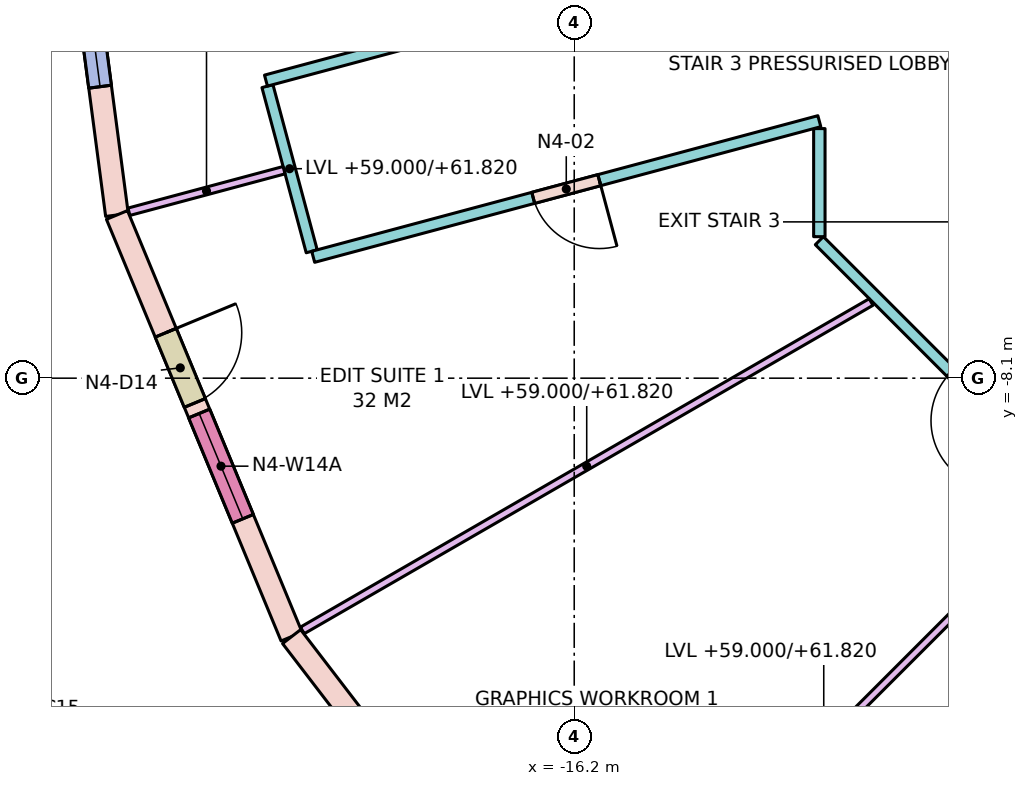
"""IFC4 building model, lengths in metres.
Left out: names, types, materials, properties, quantities, classifications, styles, units other than length and angle.
Written with IfcOpenShell. Run it as: python <this file> out.ifc"""

import sys

from ifc_helpers import new_model, si_unit, direction, frame, frame_2d, origin, place, context, subcontext, project, spatial, rectangle, extrude, element, fill, save


model = new_model("IFC4")
c1 = context("Model", 3, precision=1e-05, world=origin(), true_north=direction((0.0, 1.0)))
c2 = subcontext(c1, "Body", "Model", "MODEL_VIEW")
j1 = project(units=[si_unit("LENGTHUNIT", "METRE"), si_unit("PLANEANGLEUNIT", "RADIAN")], contexts=[c1])
p1 = place(None, origin())
s1 = spatial("IfcSite", under=j1, at=p1, CompositionType="ELEMENT")
p2 = place(p1, origin())
s2 = spatial("IfcBuilding", under=s1, at=p2, CompositionType="ELEMENT")
p3 = place(p2, frame((0.0, 0.0, 59.0)))
s3 = spatial("IfcBuildingStorey", under=s2, at=p3, CompositionType="ELEMENT", Elevation=59.0)
p4 = place(p3, frame((-23.0, 0.0, 0.0), z_axis=(0.0, 0.0, 1.0), x_axis=(0.130522880875, -0.991445297315, 0.0)))
e1 = element("IfcWall", 1, at=p4, inside=s3, PredefinedType="STANDARD", context=c2, shape_type="SweptSolid", body=[
    extrude(rectangle(XDim=6.004, YDim=0.3, at=frame_2d((3.002, 0.0))), origin(), (0.0, 0.0, 1.0), 3.72),
])
p5 = place(p4, frame((1.702, 0.0, 0.8)))
e2 = element("IfcOpeningElement", 2, at=p5, cuts=e1, PredefinedType="OPENING", context=c2, shape_type="SweptSolid", body=[
    extrude(rectangle(XDim=2.6, YDim=2.7, at=frame_2d((1.3, 1.35))), frame((0.0, 0.16, 0.0), z_axis=(0.0, -1.0, 0.0), x_axis=(1.0, 0.0, 0.0)), (0.0, 0.0, 1.0), 0.32),
])
p6 = place(p3, frame((-22.216, -5.953, 0.0), z_axis=(0.0, 0.0, 1.0), x_axis=(0.382671411433, -0.923884511653, 0.0)))
e3 = element("IfcWall", 3, at=p6, inside=s3, PredefinedType="STANDARD", context=c2, shape_type="SweptSolid", body=[
    extrude(rectangle(XDim=6.004, YDim=0.3, at=frame_2d((3.002, 0.0))), origin(), (0.0, 0.0, 1.0), 3.72),
])
p7 = place(p6, frame((1.677, 0.0, 0.0)))
e4 = element("IfcOpeningElement", 4, at=p7, cuts=e3, PredefinedType="OPENING", context=c2, shape_type="SweptSolid", body=[
    extrude(rectangle(XDim=1.0, YDim=2.4, at=frame_2d((0.5, 1.2))), frame((0.0, 0.16, 0.0), z_axis=(0.0, -1.0, 0.0), x_axis=(1.0, 0.0, 0.0)), (0.0, 0.0, 1.0), 0.32),
])
p8 = place(p6, frame((2.827, 0.0, 0.8)))
e5 = element("IfcOpeningElement", 5, at=p8, cuts=e3, PredefinedType="OPENING", context=c2, shape_type="SweptSolid", body=[
    extrude(rectangle(XDim=1.5, YDim=2.7, at=frame_2d((0.75, 1.35))), frame((0.0, 0.16, 0.0), z_axis=(0.0, -1.0, 0.0), x_axis=(1.0, 0.0, 0.0)), (0.0, 0.0, 1.0), 0.32),
])
p9 = place(p3, frame((-19.919, -11.5, 0.0), z_axis=(0.0, 0.0, 1.0), x_axis=(0.608778912074, -0.793339924758, 0.0)))
e6 = element("IfcWall", 6, at=p9, inside=s3, PredefinedType="STANDARD", context=c2, shape_type="SweptSolid", body=[
    extrude(rectangle(XDim=6.004, YDim=0.3, at=frame_2d((3.002, 0.0))), origin(), (0.0, 0.0, 1.0), 3.72),
])
p10 = place(p9, frame((1.702, 0.0, 0.8)))
e7 = element("IfcOpeningElement", 7, at=p10, cuts=e6, PredefinedType="OPENING", context=c2, shape_type="SweptSolid", body=[
    extrude(rectangle(XDim=2.6, YDim=2.7, at=frame_2d((1.3, 1.35))), frame((0.0, 0.16, 0.0), z_axis=(0.0, -1.0, 0.0), x_axis=(1.0, 0.0, 0.0)), (0.0, 0.0, 1.0), 0.32),
])
p11 = place(p3, frame((-19.654, -6.431, 0.0), z_axis=(0.0, 0.0, 1.0), x_axis=(-0.258891558609, 0.965906393436, 0.0)))
e8 = element("IfcWall", 8, at=p11, inside=s3, PredefinedType="PARTITIONING", context=c2, shape_type="SweptSolid", body=[
    extrude(rectangle(XDim=2.25, YDim=0.15, at=frame_2d((1.125, 0.0))), origin(), (0.0, 0.0, 1.0), 2.82),
])
p12 = place(p3, frame((-20.256, -4.185, 0.0), z_axis=(0.0, 0.0, 1.0), x_axis=(0.965924840231, 0.258822725092, 0.0)))
e9 = element("IfcWall", 9, at=p12, inside=s3, PredefinedType="PARTITIONING", context=c2, shape_type="SweptSolid", body=[
    extrude(rectangle(XDim=7.465, YDim=0.15, at=frame_2d((3.732, 0.0))), origin(), (0.0, 0.0, 1.0), 3.72),
])
p13 = place(p3, frame((-8.291, -10.975, 0.0), z_axis=(0.0, 0.0, 1.0), x_axis=(-0.707106781187, 0.707106781187, 0.0)))
e10 = element("IfcWall", 10, at=p13, inside=s3, PredefinedType="PARTITIONING", context=c2, shape_type="SweptSolid", body=[
    extrude(rectangle(XDim=6.624, YDim=0.15, at=frame_2d((3.312, 0.0))), origin(), (0.0, 0.0, 1.0), 2.82),
])
p14 = place(p13, frame((3.274, 0.0, 0.0)))
e11 = element("IfcOpeningElement", 11, at=p14, cuts=e10, PredefinedType="OPENING", context=c2, shape_type="SweptSolid", body=[
    extrude(rectangle(XDim=0.9, YDim=2.1, at=frame_2d((0.45, 1.05))), frame((0.0, 0.085, 0.0), z_axis=(0.0, -1.0, 0.0), x_axis=(1.0, 0.0, 0.0)), (0.0, 0.0, 1.0), 0.17),
])
p15 = place(p3, frame((-12.975, -6.238, 0.0), z_axis=(0.0, 0.0, 1.0), x_axis=(0.0, 1.0, 0.0)))
e12 = element("IfcWall", 12, at=p15, inside=s3, PredefinedType="PARTITIONING", context=c2, shape_type="SweptSolid", body=[
    extrude(rectangle(XDim=1.422, YDim=0.15, at=frame_2d((0.711, 0.0))), origin(), (0.0, 0.0, 1.0), 3.72),
])
p16 = place(p3, frame((-12.975, -4.719, 0.0), z_axis=(0.0, 0.0, 1.0), x_axis=(-0.965924499418, -0.258823997003, 0.0)))
e13 = element("IfcWall", 13, at=p16, inside=s3, PredefinedType="PARTITIONING", context=c2, shape_type="SweptSolid", body=[
    extrude(rectangle(XDim=6.894, YDim=0.15, at=frame_2d((3.447, 0.0))), origin(), (0.0, 0.0, 1.0), 3.72),
])
p17 = place(p16, frame((2.997, 0.0, 0.0)))
e14 = element("IfcOpeningElement", 14, at=p17, cuts=e13, PredefinedType="OPENING", context=c2, shape_type="SweptSolid", body=[
    extrude(rectangle(XDim=0.9, YDim=2.1, at=frame_2d((0.45, 1.05))), frame((0.0, 0.085, 0.0), z_axis=(0.0, -1.0, 0.0), x_axis=(1.0, 0.0, 0.0)), (0.0, 0.0, 1.0), 0.17),
])
p18 = place(p3, frame((-20.018, -5.364, 0.0), z_axis=(0.0, 0.0, 1.0), x_axis=(-0.965927422152, -0.258813089189, 0.0)))
e15 = element("IfcWall", 15, at=p18, inside=s3, PredefinedType="PARTITIONING", context=c2, shape_type="SweptSolid", body=[
    extrude(rectangle(XDim=2.113, YDim=0.1, at=frame_2d((1.057, 0.0))), origin(), (0.0, 0.0, 1.0), 2.82),
])
p19 = place(p3, frame((-12.294, -7.098, 0.0), z_axis=(0.0, 0.0, 1.0), x_axis=(-0.866010547425, -0.500025731086, 0.0)))
e16 = element("IfcWall", 16, at=p19, inside=s3, PredefinedType="PARTITIONING", context=c2, shape_type="SweptSolid", body=[
    extrude(rectangle(XDim=8.641, YDim=0.1, at=frame_2d((4.32, 0.0))), origin(), (0.0, 0.0, 1.0), 2.82),
])
p20 = place(p3, frame((-9.686, -9.686, 0.0), z_axis=(0.0, 0.0, 1.0), x_axis=(-0.707106781187, -0.707106781187, 0.0)))
e17 = element("IfcWall", 17, at=p20, inside=s3, PredefinedType="PARTITIONING", context=c2, shape_type="SweptSolid", body=[
    extrude(rectangle(XDim=9.138, YDim=0.1, at=frame_2d((4.569, 0.0))), origin(), (0.0, 0.0, 1.0), 2.82),
])
p21 = place(p5, origin())
e18 = element("IfcWindow", 18, at=p21, inside=s3, PartitioningType="SINGLE_PANEL", PredefinedType="WINDOW", context=c2, shape_type="SweptSolid", body=[
    extrude(rectangle(XDim=2.6, YDim=2.7, at=frame_2d((1.3, 1.35))), frame((0.0, 0.03, 0.0), z_axis=(0.0, -1.0, 0.0), x_axis=(1.0, 0.0, 0.0)), (0.0, 0.0, 1.0), 0.06),
])
fill(e2, e18)
p22 = place(p7, origin())
e19 = element("IfcDoor", 19, at=p22, inside=s3, OperationType="SINGLE_SWING_LEFT", PredefinedType="DOOR", context=c2, shape_type="SweptSolid", body=[
    extrude(rectangle(XDim=1.0, YDim=2.4, at=frame_2d((0.5, 1.2))), frame((0.0, 0.025, 0.0), z_axis=(0.0, -1.0, 0.0), x_axis=(1.0, 0.0, 0.0)), (0.0, 0.0, 1.0), 0.05),
])
fill(e4, e19)
p23 = place(p8, origin())
e20 = element("IfcWindow", 20, at=p23, inside=s3, PartitioningType="SINGLE_PANEL", PredefinedType="WINDOW", context=c2, shape_type="SweptSolid", body=[
    extrude(rectangle(XDim=1.5, YDim=2.7, at=frame_2d((0.75, 1.35))), frame((0.0, 0.03, 0.0), z_axis=(0.0, -1.0, 0.0), x_axis=(1.0, 0.0, 0.0)), (0.0, 0.0, 1.0), 0.06),
])
fill(e5, e20)
p24 = place(p17, origin())
e21 = element("IfcDoor", 21, at=p24, inside=s3, OperationType="SINGLE_SWING_LEFT", PredefinedType="DOOR", context=c2, shape_type="SweptSolid", body=[
    extrude(rectangle(XDim=0.9, YDim=2.1, at=frame_2d((0.45, 1.05))), frame((0.0, 0.025, 0.0), z_axis=(0.0, -1.0, 0.0), x_axis=(1.0, 0.0, 0.0)), (0.0, 0.0, 1.0), 0.05),
])
fill(e14, e21)
save(model, sys.argv[1])
